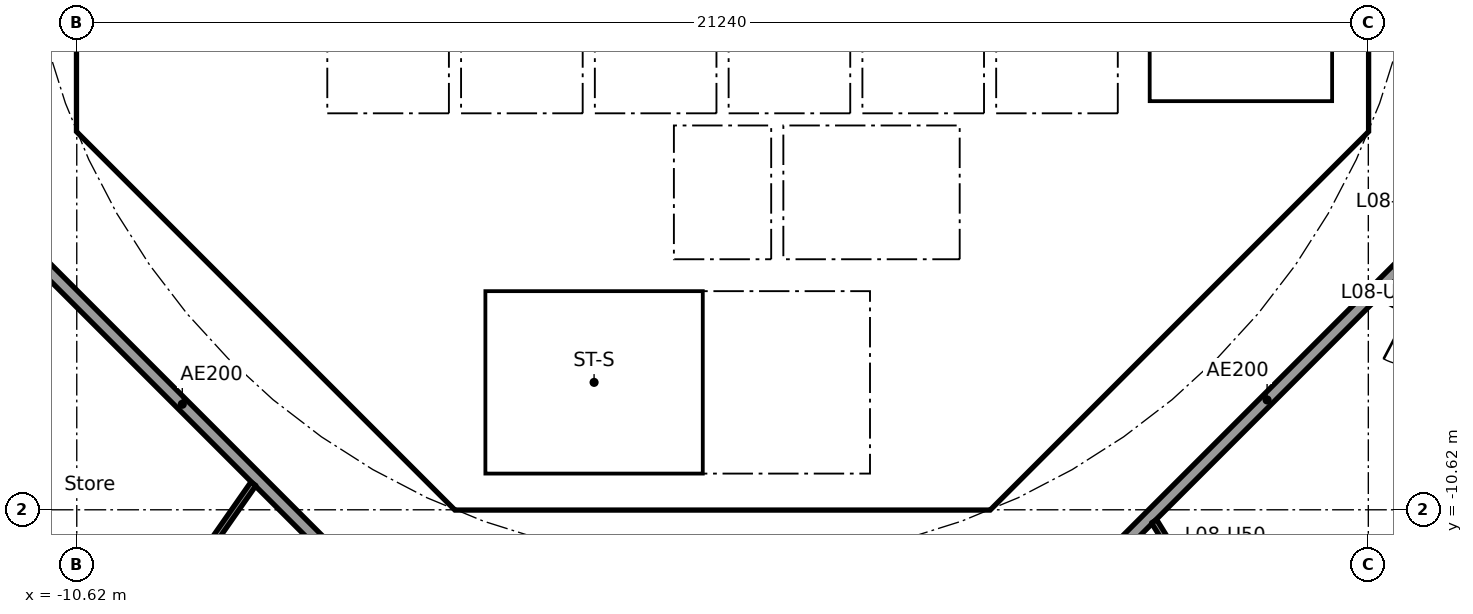
"""IFC4 building model, lengths in metres.
Left out: names, types, materials, properties, quantities, classifications, styles, units other than length and angle.
Written with IfcOpenShell. Run it as: python <this file> out.ifc"""

import sys

from ifc_helpers import new_model, si_unit, direction, frame, frame_2d, origin, place, context, subcontext, project, spatial, polyline, rectangle, outline, extrude, element, fill, save


model = new_model("IFC4")
c1 = context("Model", 3, precision=1e-05, world=origin(), true_north=direction((0.0, 1.0)))
c2 = subcontext(c1, "Body", "Model", "MODEL_VIEW")
j1 = project(units=[si_unit("LENGTHUNIT", "METRE"), si_unit("PLANEANGLEUNIT", "RADIAN")], contexts=[c1])
p1 = place(None, origin())
s1 = spatial("IfcSite", under=j1, at=p1, CompositionType="ELEMENT")
p2 = place(p1, origin())
s2 = spatial("IfcBuilding", under=s1, at=p2, CompositionType="ELEMENT")
p3 = place(p2, frame((0.0, 0.0, 38.1)))
s3 = spatial("IfcBuildingStorey", under=s2, at=p3, CompositionType="ELEMENT", Elevation=38.1)
p4 = place(p3, frame((-10.325, 3.801, 0.0), z_axis=(0.0, 0.0, 1.0), x_axis=(0.0, -1.0, 0.0)))
e1 = element("IfcWall", 1, at=p4, inside=s3, PredefinedType="SHEAR", context=c2, shape_type="SweptSolid", body=[
    extrude(rectangle(XDim=7.602, YDim=0.6, at=frame_2d((3.801, 0.0))), origin(), (0.0, 0.0, 1.0), 3.44),
])
p5 = place(p4, frame((0.651, 0.0, 0.0)))
e2 = element("IfcOpeningElement", 2, at=p5, cuts=e1, PredefinedType="OPENING", context=c2, shape_type="SweptSolid", body=[
    extrude(rectangle(XDim=1.5, YDim=2.1, at=frame_2d((0.75, 1.05))), frame((0.0, 0.31, 0.0), z_axis=(0.0, -1.0, 0.0), x_axis=(1.0, 0.0, 0.0)), (0.0, 0.0, 1.0), 0.62),
])
p6 = place(p4, frame((5.451, 0.0, 0.0)))
e3 = element("IfcOpeningElement", 3, at=p6, cuts=e1, PredefinedType="OPENING", context=c2, shape_type="SweptSolid", body=[
    extrude(rectangle(XDim=1.5, YDim=2.1, at=frame_2d((0.75, 1.05))), frame((0.0, 0.31, 0.0), z_axis=(0.0, -1.0, 0.0), x_axis=(1.0, 0.0, 0.0)), (0.0, 0.0, 1.0), 0.62),
])
p7 = place(p3, frame((-9.988, -4.613, 0.0), z_axis=(0.0, 0.0, 1.0), x_axis=(0.707106781187, -0.707106781187, 0.0)))
e4 = element("IfcWall", 4, at=p7, inside=s3, PredefinedType="SHEAR", context=c2, shape_type="SweptSolid", body=[
    extrude(rectangle(XDim=7.602, YDim=0.6, at=frame_2d((3.801, 0.0))), origin(), (0.0, 0.0, 1.0), 3.44),
])
p8 = place(p7, frame((6.151, 0.0, 0.0)))
e5 = element("IfcOpeningElement", 5, at=p8, cuts=e4, PredefinedType="OPENING", context=c2, shape_type="SweptSolid", body=[
    extrude(rectangle(XDim=1.1, YDim=2.1, at=frame_2d((0.55, 1.05))), frame((0.0, 0.31, 0.0), z_axis=(0.0, -1.0, 0.0), x_axis=(1.0, 0.0, 0.0)), (0.0, 0.0, 1.0), 0.62),
])
p9 = place(p3, frame((4.613, -9.988, 0.0), z_axis=(0.0, 0.0, 1.0), x_axis=(0.707106781187, 0.707106781187, 0.0)))
e6 = element("IfcWall", 6, at=p9, inside=s3, PredefinedType="SHEAR", context=c2, shape_type="SweptSolid", body=[
    extrude(rectangle(XDim=7.602, YDim=0.6, at=frame_2d((3.801, 0.0))), origin(), (0.0, 0.0, 1.0), 3.44),
])
p10 = place(p9, frame((3.201, 0.0, 0.0)))
e7 = element("IfcOpeningElement", 7, at=p10, cuts=e6, PredefinedType="OPENING", context=c2, shape_type="SweptSolid", body=[
    extrude(rectangle(XDim=1.2, YDim=2.1, at=frame_2d((0.6, 1.05))), frame((0.0, 0.31, 0.0), z_axis=(0.0, -1.0, 0.0), x_axis=(1.0, 0.0, 0.0)), (0.0, 0.0, 1.0), 0.62),
])
p11 = place(p3, frame((4.0, -10.025, 0.0), z_axis=(0.0, 0.0, 1.0), x_axis=(0.0, 1.0, 0.0)))
e8 = element("IfcWall", 8, at=p11, inside=s3, PredefinedType="SOLIDWALL", context=c2, shape_type="SweptSolid", body=[
    extrude(rectangle(XDim=3.0, YDim=0.2, at=frame_2d((1.5, 0.0))), origin(), (0.0, 0.0, 1.0), 3.44),
])
p12 = place(p11, frame((0.975, 0.0, 0.0)))
e9 = element("IfcOpeningElement", 9, at=p12, cuts=e8, PredefinedType="OPENING", context=c2, shape_type="SweptSolid", body=[
    extrude(rectangle(XDim=1.1, YDim=2.1, at=frame_2d((0.55, 1.05))), frame((0.0, 0.11, 0.0), z_axis=(0.0, -1.0, 0.0), x_axis=(1.0, 0.0, 0.0)), (0.0, 0.0, 1.0), 0.22),
])
p13 = place(p3, frame((-6.2, -7.827, 0.0), z_axis=(0.0, 0.0, 1.0), x_axis=(0.0, 1.0, 0.0)))
e10 = element("IfcWall", 10, at=p13, inside=s3, PredefinedType="PARTITIONING", context=c2, shape_type="SweptSolid", body=[
    extrude(rectangle(XDim=3.527, YDim=0.15, at=frame_2d((1.763, 0.0))), origin(), (0.0, 0.0, 1.0), 3.44),
])
p14 = place(p13, frame((2.365, 0.0, 0.0)))
e11 = element("IfcOpeningElement", 11, at=p14, cuts=e10, PredefinedType="OPENING", context=c2, shape_type="SweptSolid", body=[
    extrude(rectangle(XDim=0.9, YDim=2.1, at=frame_2d((0.45, 1.05))), frame((0.0, 0.085, 0.0), z_axis=(0.0, -1.0, 0.0), x_axis=(1.0, 0.0, 0.0)), (0.0, 0.0, 1.0), 0.17),
])
p15 = place(p13, frame((0.489, 0.0, 0.0)))
e12 = element("IfcOpeningElement", 12, at=p15, cuts=e10, PredefinedType="OPENING", context=c2, shape_type="SweptSolid", body=[
    extrude(rectangle(XDim=0.9, YDim=2.1, at=frame_2d((0.45, 1.05))), frame((0.0, 0.085, 0.0), z_axis=(0.0, -1.0, 0.0), x_axis=(1.0, 0.0, 0.0)), (0.0, 0.0, 1.0), 0.17),
])
p16 = place(p3, frame((4.0, -6.5, 0.0), z_axis=(0.0, 0.0, 1.0), x_axis=(0.0, 1.0, 0.0)))
e13 = element("IfcWall", 13, at=p16, inside=s3, PredefinedType="SOLIDWALL", context=c2, shape_type="SweptSolid", body=[
    extrude(rectangle(XDim=2.2, YDim=0.2, at=frame_2d((1.1, 0.0))), origin(), (0.0, 0.0, 1.0), 3.44),
])
p17 = place(p16, frame((0.55, 0.0, 0.0)))
e14 = element("IfcOpeningElement", 14, at=p17, cuts=e13, PredefinedType="OPENING", context=c2, shape_type="SweptSolid", body=[
    extrude(rectangle(XDim=1.1, YDim=2.1, at=frame_2d((0.55, 1.05))), frame((0.0, 0.11, 0.0), z_axis=(0.0, -1.0, 0.0), x_axis=(1.0, 0.0, 0.0)), (0.0, 0.0, 1.0), 0.22),
])
p18 = place(p3, frame((-4.0, -6.5, 0.0), z_axis=(0.0, 0.0, 1.0), x_axis=(0.0, 1.0, 0.0)))
e15 = element("IfcWall", 15, at=p18, inside=s3, PredefinedType="SOLIDWALL", context=c2, shape_type="SweptSolid", body=[
    extrude(rectangle(XDim=2.2, YDim=0.2, at=frame_2d((1.1, 0.0))), origin(), (0.0, 0.0, 1.0), 3.44),
])
p19 = place(p18, frame((0.65, 0.0, 0.0)))
e16 = element("IfcOpeningElement", 16, at=p19, cuts=e15, PredefinedType="OPENING", context=c2, shape_type="SweptSolid", body=[
    extrude(rectangle(XDim=0.9, YDim=2.1, at=frame_2d((0.45, 1.05))), frame((0.0, 0.11, 0.0), z_axis=(0.0, -1.0, 0.0), x_axis=(1.0, 0.0, 0.0)), (0.0, 0.0, 1.0), 0.22),
])
p20 = place(p3, origin())
e17 = element("IfcWall", 17, at=p20, inside=s3, PredefinedType="SHEAR", context=c2, shape_type="SweptSolid", body=[
    extrude(outline(polyline([(-10.625, -3.801), (-10.025, -3.801), (-10.025, -4.152), (-9.776, -4.401), (-10.2, -4.825), (-10.625, -4.401), (-10.625, -3.801)])), origin(), (0.0, 0.0, 1.0), 3.44),
])
p21 = place(p3, origin())
e18 = element("IfcWall", 18, at=p21, inside=s3, PredefinedType="SHEAR", context=c2, shape_type="SweptSolid", body=[
    extrude(outline(polyline([(-4.152, -10.025), (4.152, -10.025), (4.401, -9.776), (4.825, -10.2), (4.401, -10.625), (-4.401, -10.625), (-4.825, -10.2), (-4.401, -9.776), (-4.152, -10.025)])), origin(), (0.0, 0.0, 1.0), 3.44),
])
p22 = place(p3, origin())
e19 = element("IfcWall", 19, at=p22, inside=s3, PredefinedType="SHEAR", context=c2, shape_type="SweptSolid", body=[
    extrude(outline(polyline([(9.776, -4.401), (10.025, -4.152), (10.025, -3.801), (10.025, 4.152), (9.776, 4.401), (10.2, 4.825), (10.625, 4.401), (10.625, -4.401), (10.2, -4.825), (9.776, -4.401)])), origin(), (0.0, 0.0, 1.0), 3.44),
])
p23 = place(p3, frame((-10.025, -4.0, 0.0), z_axis=(0.0, 0.0, 1.0), x_axis=(1.0, 0.0, 0.0)))
e20 = element("IfcWall", 20, at=p23, inside=s3, PredefinedType="PARTITIONING", context=c2, shape_type="SweptSolid", body=[
    extrude(rectangle(XDim=3.325, YDim=0.2, at=frame_2d((1.662, 0.0))), origin(), (0.0, 0.0, 1.0), 3.44),
])
p24 = place(p3, frame((-8.301, -5.8, 0.0), z_axis=(0.0, 0.0, 1.0), x_axis=(1.0, 0.0, 0.0)))
e21 = element("IfcWall", 21, at=p24, inside=s3, PredefinedType="PARTITIONING", context=c2, shape_type="SweptSolid", body=[
    extrude(rectangle(XDim=2.026, YDim=0.15, at=frame_2d((1.013, 0.0))), origin(), (0.0, 0.0, 1.0), 3.44),
])
for number, where, z_axis, x_axis in (
    (22, (-0.9, -6.5, 0.0), (0.0, 0.0, 1.0), (0.0, 1.0, 0.0)),
    (23, (0.9, -6.5, 0.0), (0.0, 0.0, 1.0), (0.0, 1.0, 0.0)),
):
    element("IfcWall", number, at=place(p3, frame(where, z_axis=z_axis, x_axis=x_axis)), inside=s3, PredefinedType="SOLIDWALL", context=c2, shape_type="SweptSolid", body=[
        extrude(rectangle(XDim=2.2, YDim=0.2, at=frame_2d((1.1, 0.0))), origin(), (0.0, 0.0, 1.0), 3.44),
    ])
p25 = place(p3, origin())
e24 = element("IfcWall", 24, at=p25, inside=s3, PredefinedType="SOLIDWALL", context=c2, shape_type="SweptSolid", body=[
    extrude(outline(polyline([(-6.7, -2.1), (-6.5, -2.1), (-6.5, -4.1), (-4.5, -4.1), (-4.5, -2.1), (-4.3, -2.1), (-4.3, -4.1), (-2.3, -4.1), (-2.3, -2.1), (-2.1, -2.1), (-2.1, -4.1), (-0.1, -4.1), (-0.1, -2.1), (0.1, -2.1), (0.1, -4.1), (2.1, -4.1), (2.1, -2.1), (2.3, -2.1), (2.3, -4.1), (4.3, -4.1), (4.3, -2.1), (4.5, -2.1), (4.5, -4.1), (6.5, -4.1), (6.5, -2.1), (6.7, -2.1), (6.7, -4.3), (-6.7, -4.3), (-6.7, -2.1)])), origin(), (0.0, 0.0, 1.0), 3.44),
])
p26 = place(p3, origin())
e25 = element("IfcWall", 25, at=p26, inside=s3, PredefinedType="SOLIDWALL", context=c2, shape_type="SweptSolid", body=[
    extrude(outline(polyline([(-3.9, -10.025), (-4.1, -10.025), (-4.1, -7.025), (-3.9, -7.025), (-3.9, -10.025)])), origin(), (0.0, 0.0, 1.0), 3.44),
])
p27 = place(p3, origin())
e26 = element("IfcWall", 26, at=p27, inside=s3, PredefinedType="SOLIDWALL", context=c2, shape_type="SweptSolid", body=[
    extrude(outline(polyline([(4.1, -7.025), (-4.1, -7.025), (-4.1, -6.5), (4.1, -6.5), (4.1, -7.025)])), origin(), (0.0, 0.0, 1.0), 3.44),
])
p28 = place(p3, origin())
e27 = element("IfcWall", 27, at=p28, inside=s3, PredefinedType="SOLIDWALL", context=c2, shape_type="SweptSolid", body=[
    extrude(outline(polyline([(7.025, -3.9), (6.7, -3.9), (6.7, 3.9), (7.025, 3.9), (7.025, -3.9)])), origin(), (0.0, 0.0, 1.0), 3.44),
])
p29 = place(p3, origin())
e28 = element("IfcWall", 28, at=p29, inside=s3, PredefinedType="SOLIDWALL", context=c2, shape_type="SweptSolid", body=[
    extrude(outline(polyline([(10.025, -4.1), (6.7, -4.1), (6.7, -3.9), (10.025, -3.9), (10.025, -4.1)])), origin(), (0.0, 0.0, 1.0), 3.44),
])
p30 = place(p3, frame((-12.635, -5.134, 0.0), z_axis=(0.0, 0.0, 1.0), x_axis=(0.707106781187, -0.707106781187, 0.0)))
e29 = element("IfcWall", 29, at=p30, inside=s3, PredefinedType="PARTITIONING", context=c2, shape_type="SweptSolid", body=[
    extrude(rectangle(XDim=10.609, YDim=0.2, at=frame_2d((5.305, 0.0))), origin(), (0.0, 0.0, 1.0), 3.44),
])
p31 = place(p3, frame((5.275, -12.494, 0.0), z_axis=(0.0, 0.0, 1.0), x_axis=(0.707106781187, 0.707106781187, 0.0)))
e30 = element("IfcWall", 30, at=p31, inside=s3, PredefinedType="PARTITIONING", context=c2, shape_type="SweptSolid", body=[
    extrude(rectangle(XDim=10.409, YDim=0.2, at=frame_2d((5.205, 0.0))), origin(), (0.0, 0.0, 1.0), 3.44),
])
p32 = place(p31, frame((8.508, 0.0, 0.0)))
e31 = element("IfcOpeningElement", 31, at=p32, cuts=e30, PredefinedType="OPENING", context=c2, shape_type="SweptSolid", body=[
    extrude(rectangle(XDim=1.0, YDim=2.1, at=frame_2d((0.5, 1.05))), frame((0.0, 0.11, 0.0), z_axis=(0.0, -1.0, 0.0), x_axis=(1.0, 0.0, 0.0)), (0.0, 0.0, 1.0), 0.22),
])
p33 = place(p3, frame((-13.222, -10.007, 0.0), z_axis=(0.0, 0.0, 1.0), x_axis=(0.640807748916, -0.767701393075, 0.0)))
e32 = element("IfcWall", 32, at=p33, inside=s3, PredefinedType="PARTITIONING", context=c2, shape_type="SweptSolid", body=[
    extrude(rectangle(XDim=4.737, YDim=0.1, at=frame_2d((2.368, 0.0))), origin(), (0.0, 0.0, 1.0), 2.756),
])
p34 = place(p3, frame((-7.715, -10.193, 0.0), z_axis=(0.0, 0.0, 1.0), x_axis=(-0.573126502256, -0.819466907454, 0.0)))
e33 = element("IfcWall", 33, at=p34, inside=s3, PredefinedType="PARTITIONING", context=c2, shape_type="SweptSolid", body=[
    extrude(rectangle(XDim=9.954, YDim=0.1, at=frame_2d((4.977, 0.0))), origin(), (0.0, 0.0, 1.0), 2.687),
])
p35 = place(p34, frame((6.631, 0.0, 0.0)))
e34 = element("IfcOpeningElement", 34, at=p35, cuts=e33, PredefinedType="OPENING", context=c2, shape_type="SweptSolid", body=[
    extrude(rectangle(XDim=0.9, YDim=2.1, at=frame_2d((0.45, 1.05))), frame((0.0, 0.06, 0.0), z_axis=(0.0, -1.0, 0.0), x_axis=(1.0, 0.0, 0.0)), (0.0, 0.0, 1.0), 0.12),
])
p36 = place(p34, frame((1.678, 0.0, 0.0)))
e35 = element("IfcOpeningElement", 35, at=p36, cuts=e33, PredefinedType="OPENING", context=c2, shape_type="SweptSolid", body=[
    extrude(rectangle(XDim=0.9, YDim=2.1, at=frame_2d((0.45, 1.05))), frame((0.0, 0.06, 0.0), z_axis=(0.0, -1.0, 0.0), x_axis=(1.0, 0.0, 0.0)), (0.0, 0.0, 1.0), 0.12),
])
p37 = place(p3, frame((7.097, -10.81, 0.0), z_axis=(0.0, 0.0, 1.0), x_axis=(0.526453266471, -0.850204068576, 0.0)))
e36 = element("IfcWall", 36, at=p37, inside=s3, PredefinedType="PARTITIONING", context=c2, shape_type="SweptSolid", body=[
    extrude(rectangle(XDim=19.85, YDim=0.1, at=frame_2d((9.925, 0.0))), origin(), (0.0, 0.0, 1.0), 2.687),
])
p38 = place(p37, frame((0.35, 0.0, 0.0)))
e37 = element("IfcOpeningElement", 37, at=p38, cuts=e36, PredefinedType="OPENING", context=c2, shape_type="SweptSolid", body=[
    extrude(rectangle(XDim=0.9, YDim=2.1, at=frame_2d((0.45, 1.05))), frame((0.0, 0.06, 0.0), z_axis=(0.0, -1.0, 0.0), x_axis=(1.0, 0.0, 0.0)), (0.0, 0.0, 1.0), 0.12),
])
p39 = place(p37, frame((8.795, 0.0, 0.0)))
e38 = element("IfcOpeningElement", 38, at=p39, cuts=e36, PredefinedType="OPENING", context=c2, shape_type="SweptSolid", body=[
    extrude(rectangle(XDim=0.9, YDim=2.1, at=frame_2d((0.45, 1.05))), frame((0.0, 0.06, 0.0), z_axis=(0.0, -1.0, 0.0), x_axis=(1.0, 0.0, 0.0)), (0.0, 0.0, 1.0), 0.12),
])
p40 = place(p37, frame((15.935, 0.0, 0.0)))
e39 = element("IfcOpeningElement", 39, at=p40, cuts=e36, PredefinedType="OPENING", context=c2, shape_type="SweptSolid", body=[
    extrude(rectangle(XDim=0.9, YDim=2.1, at=frame_2d((0.45, 1.05))), frame((0.0, 0.06, 0.0), z_axis=(0.0, -1.0, 0.0), x_axis=(1.0, 0.0, 0.0)), (0.0, 0.0, 1.0), 0.12),
])
p41 = place(p3, frame((10.813, -7.091, 0.0), z_axis=(0.0, 0.0, 1.0), x_axis=(0.885182649479, -0.465243674928, 0.0)))
e40 = element("IfcWall", 40, at=p41, inside=s3, PredefinedType="PARTITIONING", context=c2, shape_type="SweptSolid", body=[
    extrude(rectangle(XDim=12.551, YDim=0.1, at=frame_2d((6.275, 0.0))), origin(), (0.0, 0.0, 1.0), 2.687),
])
p42 = place(p41, frame((0.539, 0.0, 0.0)))
e41 = element("IfcOpeningElement", 41, at=p42, cuts=e40, PredefinedType="OPENING", context=c2, shape_type="SweptSolid", body=[
    extrude(rectangle(XDim=0.9, YDim=2.1, at=frame_2d((0.45, 1.05))), frame((0.0, 0.06, 0.0), z_axis=(0.0, -1.0, 0.0), x_axis=(1.0, 0.0, 0.0)), (0.0, 0.0, 1.0), 0.12),
])
p43 = place(p41, frame((8.494, 0.0, 0.0)))
e42 = element("IfcOpeningElement", 42, at=p43, cuts=e40, PredefinedType="OPENING", context=c2, shape_type="SweptSolid", body=[
    extrude(rectangle(XDim=0.9, YDim=2.1, at=frame_2d((0.45, 1.05))), frame((0.0, 0.06, 0.0), z_axis=(0.0, -1.0, 0.0), x_axis=(1.0, 0.0, 0.0)), (0.0, 0.0, 1.0), 0.12),
])
p44 = place(p17, origin())
e43 = element("IfcDoor", 43, at=p44, inside=s3, OperationType="DOUBLE_DOOR_SLIDING", PredefinedType="DOOR", context=c2, shape_type="SweptSolid", body=[
    extrude(rectangle(XDim=1.1, YDim=2.1, at=frame_2d((0.55, 1.05))), frame((0.0, 0.025, 0.0), z_axis=(0.0, -1.0, 0.0), x_axis=(1.0, 0.0, 0.0)), (0.0, 0.0, 1.0), 0.05),
])
fill(e14, e43)
p45 = place(p12, origin())
e44 = element("IfcDoor", 44, at=p45, inside=s3, OperationType="SINGLE_SWING_LEFT", PredefinedType="DOOR", context=c2, shape_type="SweptSolid", body=[
    extrude(rectangle(XDim=1.1, YDim=2.1, at=frame_2d((0.55, 1.05))), frame((0.0, 0.025, 0.0), z_axis=(0.0, -1.0, 0.0), x_axis=(1.0, 0.0, 0.0)), (0.0, 0.0, 1.0), 0.05),
])
fill(e9, e44)
p46 = place(p14, origin())
e45 = element("IfcDoor", 45, at=p46, inside=s3, OperationType="SINGLE_SWING_LEFT", PredefinedType="DOOR", context=c2, shape_type="SweptSolid", body=[
    extrude(rectangle(XDim=0.9, YDim=2.1, at=frame_2d((0.45, 1.05))), frame((0.0, 0.025, 0.0), z_axis=(0.0, -1.0, 0.0), x_axis=(1.0, 0.0, 0.0)), (0.0, 0.0, 1.0), 0.05),
])
fill(e11, e45)
p47 = place(p15, origin())
e46 = element("IfcDoor", 46, at=p47, inside=s3, OperationType="SINGLE_SWING_LEFT", PredefinedType="DOOR", context=c2, shape_type="SweptSolid", body=[
    extrude(rectangle(XDim=0.9, YDim=2.1, at=frame_2d((0.45, 1.05))), frame((0.0, 0.025, 0.0), z_axis=(0.0, -1.0, 0.0), x_axis=(1.0, 0.0, 0.0)), (0.0, 0.0, 1.0), 0.05),
])
fill(e12, e46)
p48 = place(p19, frame((0.9, 0.0, 0.0), x_axis=(-1.0, 0.0, 0.0)))
e47 = element("IfcDoor", 47, at=p48, inside=s3, OperationType="SINGLE_SWING_LEFT", PredefinedType="DOOR", context=c2, shape_type="SweptSolid", body=[
    extrude(rectangle(XDim=0.9, YDim=2.1, at=frame_2d((0.45, 1.05))), frame((0.0, 0.025, 0.0), z_axis=(0.0, -1.0, 0.0), x_axis=(1.0, 0.0, 0.0)), (0.0, 0.0, 1.0), 0.05),
])
fill(e16, e47)
p49 = place(p10, origin())
e48 = element("IfcDoor", 48, at=p49, inside=s3, OperationType="SINGLE_SWING_RIGHT", PredefinedType="DOOR", context=c2, shape_type="SweptSolid", body=[
    extrude(rectangle(XDim=1.2, YDim=2.1, at=frame_2d((0.6, 1.05))), frame((0.0, 0.025, 0.0), z_axis=(0.0, -1.0, 0.0), x_axis=(1.0, 0.0, 0.0)), (0.0, 0.0, 1.0), 0.05),
])
fill(e7, e48)
p50 = place(p6, origin())
e49 = element("IfcDoor", 49, at=p50, inside=s3, OperationType="DOUBLE_DOOR_SINGLE_SWING", PredefinedType="DOOR", context=c2, shape_type="SweptSolid", body=[
    extrude(rectangle(XDim=1.5, YDim=2.1, at=frame_2d((0.75, 1.05))), frame((0.0, 0.025, 0.0), z_axis=(0.0, -1.0, 0.0), x_axis=(1.0, 0.0, 0.0)), (0.0, 0.0, 1.0), 0.05),
])
fill(e3, e49)
p51 = place(p8, origin())
e50 = element("IfcDoor", 50, at=p51, inside=s3, OperationType="SINGLE_SWING_RIGHT", PredefinedType="DOOR", context=c2, shape_type="SweptSolid", body=[
    extrude(rectangle(XDim=1.1, YDim=2.1, at=frame_2d((0.55, 1.05))), frame((0.0, 0.025, 0.0), z_axis=(0.0, -1.0, 0.0), x_axis=(1.0, 0.0, 0.0)), (0.0, 0.0, 1.0), 0.05),
])
fill(e5, e50)
save(model, sys.argv[1])
